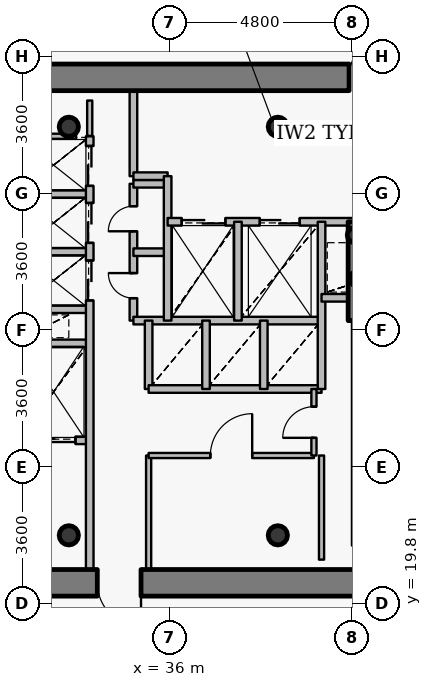
"""IFC4 building model, lengths in metres.
Left out: names, types, materials, properties, quantities, classifications, styles, units other than length and angle.
Written with IfcOpenShell. Run it as: python <this file> out.ifc"""

import sys

from ifc_helpers import new_model, si_unit, direction, frame, frame_2d, origin, origin_2d, place, context, subcontext, project, spatial, rectangle, hollow_circle, extrude, source, transform, mapped, element, fill, save


model = new_model("IFC4")
c1 = context("Model", 3, precision=1e-05, world=origin(), true_north=direction((0.0, 1.0)))
c2 = subcontext(c1, "Body", "Model", "MODEL_VIEW")
j1 = project(units=[si_unit("LENGTHUNIT", "METRE"), si_unit("PLANEANGLEUNIT", "RADIAN")], contexts=[c1])
p1 = place(None, origin())
s1 = spatial("IfcSite", under=j1, at=p1, CompositionType="ELEMENT")
p2 = place(p1, origin())
s2 = spatial("IfcBuilding", under=s1, at=p2, CompositionType="ELEMENT")
p3 = place(p2, frame((0.0, 0.0, 225.3)))
s3 = spatial("IfcBuildingStorey", under=s2, at=p3, CompositionType="ELEMENT", Elevation=225.3)
for number, where, z_axis, x_axis in (
    (1, (33.35, 21.6, 0.0), (0.0, 0.0, 1.0), (1.0, 0.0, 0.0)),
    (2, (38.85, 21.6, 0.0), (0.0, 0.0, 1.0), (1.0, 0.0, 0.0)),
    (3, (38.85, 32.35, 0.0), (0.0, 0.0, 1.0), (1.0, 0.0, 0.0)),
    (4, (33.35, 32.35, 0.0), (0.0, 0.0, 1.0), (1.0, 0.0, 0.0)),
):
    element("IfcColumn", number, at=place(p3, frame(where, z_axis=z_axis, x_axis=x_axis)), inside=s3, PredefinedType="COLUMN", context=c2, shape_type="SweptSolid", body=[
        extrude(hollow_circle(Radius=0.254, WallThickness=0.02, at=origin_2d()), origin(), (0.0, 0.0, 1.0), 3.75),
    ])
for number, where, z_axis, x_axis in (
    (5, (40.95, 28.35, 0.0), (0.0, 0.0, 1.0), (1.0, 0.0, 0.0)),
    (6, (40.88, 29.5, 0.0), (0.0, 0.0, 1.0), (1.0, 0.0, 0.0)),
):
    element("IfcColumn", number, at=place(p3, frame(where, z_axis=z_axis, x_axis=x_axis)), inside=s3, PredefinedType="COLUMN", context=c2, shape_type="SweptSolid", body=[
        extrude(hollow_circle(Radius=0.203, WallThickness=0.016, at=origin_2d()), origin(), (0.0, 0.0, 1.0), 3.75),
    ])
p4 = place(p3, frame((27.05, 33.65, 0.0), z_axis=(0.0, 0.0, 1.0), x_axis=(1.0, 0.0, 0.0)))
e7 = element("IfcWall", 7, at=p4, inside=s3, PredefinedType="SHEAR", context=c2, shape_type="SweptSolid", body=[
    extrude(rectangle(XDim=17.9, YDim=0.7, at=frame_2d((8.95, 0.0))), origin(), (0.0, 0.0, 1.0), 3.05),
])
p5 = place(p4, frame((13.675, 0.0, 0.0)))
e8 = element("IfcOpeningElement", 8, at=p5, cuts=e7, PredefinedType="OPENING", context=c2, shape_type="SweptSolid", body=[
    extrude(rectangle(XDim=1.15, YDim=2.15, at=origin_2d()), frame((0.575, 0.36, 1.075), z_axis=(0.0, -1.0, 0.0), x_axis=(1.0, 0.0, 0.0)), (0.0, 0.0, 1.0), 0.72),
])
p6 = place(p3, frame((44.95, 20.35, 0.0), z_axis=(0.0, 0.0, 1.0), x_axis=(-1.0, 0.0, 0.0)))
e9 = element("IfcWall", 9, at=p6, inside=s3, PredefinedType="SHEAR", context=c2, shape_type="SweptSolid", body=[
    extrude(rectangle(XDim=17.9, YDim=0.7, at=frame_2d((8.95, 0.0))), origin(), (0.0, 0.0, 1.0), 3.05),
])
p7 = place(p6, frame((9.7, 0.0, 0.0)))
e10 = element("IfcOpeningElement", 10, at=p7, cuts=e9, PredefinedType="OPENING", context=c2, shape_type="SweptSolid", body=[
    extrude(rectangle(XDim=1.15, YDim=2.15, at=origin_2d()), frame((0.575, 0.36, 1.075), z_axis=(0.0, -1.0, 0.0), x_axis=(1.0, 0.0, 0.0)), (0.0, 0.0, 1.0), 0.72),
])
p8 = place(p3, frame((40.9, 27.25, 0.0), z_axis=(0.0, 0.0, 1.0), x_axis=(0.0, 1.0, 0.0)))
e11 = element("IfcWall", 11, at=p8, inside=s3, PredefinedType="SHEAR", context=c2, shape_type="SweptSolid", body=[
    extrude(rectangle(XDim=2.6, YDim=0.4, at=frame_2d((1.3, 0.0))), origin(), (0.0, 0.0, 1.0), 3.1),
])
p9 = place(p3, frame((32.0, 24.1, 0.0), z_axis=(0.0, 0.0, 1.0), x_axis=(1.0, 0.0, 0.0)))
e12 = element("IfcWall", 12, at=p9, inside=s3, PredefinedType="PARTITIONING", context=c2, shape_type="SweptSolid", body=[
    extrude(rectangle(XDim=1.9, YDim=0.2, at=frame_2d((0.95, 0.0))), origin(), (0.0, 0.0, 1.0), 3.085),
])
p10 = place(p9, frame((0.375, 0.0, 0.0)))
e13 = element("IfcOpeningElement", 13, at=p10, cuts=e12, PredefinedType="OPENING", context=c2, shape_type="SweptSolid", body=[
    extrude(rectangle(XDim=1.15, YDim=2.15, at=origin_2d()), frame((0.575, 0.11, 1.075), z_axis=(0.0, -1.0, 0.0), x_axis=(1.0, 0.0, 0.0)), (0.0, 0.0, 1.0), 0.22),
])
for number, where, z_axis, x_axis in (
    (14, (32.0, 26.65, 0.0), (0.0, 0.0, 1.0), (1.0, 0.0, 0.0)),
    (15, (32.0, 27.55, 0.0), (0.0, 0.0, 1.0), (1.0, 0.0, 0.0)),
    (16, (32.0, 29.06, 0.0), (0.0, 0.0, 1.0), (1.0, 0.0, 0.0)),
    (17, (32.0, 30.58, 0.0), (0.0, 0.0, 1.0), (1.0, 0.0, 0.0)),
):
    element("IfcWall", number, at=place(p3, frame(where, z_axis=z_axis, x_axis=x_axis)), inside=s3, PredefinedType="PARTITIONING", context=c2, shape_type="SweptSolid", body=[
        extrude(rectangle(XDim=1.9, YDim=0.2, at=frame_2d((0.95, 0.0))), origin(), (0.0, 0.0, 1.0), 3.085),
    ])
p11 = place(p3, frame((33.9, 20.7, 0.0), z_axis=(0.0, 0.0, 1.0), x_axis=(0.0, 1.0, 0.0)))
e18 = element("IfcWall", 18, at=p11, inside=s3, PredefinedType="PARTITIONING", context=c2, shape_type="SweptSolid", body=[
    extrude(rectangle(XDim=11.4, YDim=0.2, at=frame_2d((5.7, 0.0))), origin(), (0.0, 0.0, 1.0), 3.085),
])
p12 = place(p11, frame((7.08, 0.0, 0.0)))
e19 = element("IfcOpeningElement", 19, at=p12, cuts=e18, PredefinedType="OPENING", context=c2, shape_type="SweptSolid", body=[
    extrude(rectangle(XDim=1.05, YDim=2.15, at=origin_2d()), frame((0.525, 0.11, 1.075), z_axis=(0.0, -1.0, 0.0), x_axis=(1.0, 0.0, 0.0)), (0.0, 0.0, 1.0), 0.22),
])
p13 = place(p11, frame((8.595, 0.0, 0.0)))
e20 = element("IfcOpeningElement", 20, at=p13, cuts=e18, PredefinedType="OPENING", context=c2, shape_type="SweptSolid", body=[
    extrude(rectangle(XDim=1.05, YDim=2.15, at=origin_2d()), frame((0.525, 0.11, 1.075), z_axis=(0.0, -1.0, 0.0), x_axis=(1.0, 0.0, 0.0)), (0.0, 0.0, 1.0), 0.22),
])
p14 = place(p11, frame((10.095, 0.0, 0.0)))
e21 = element("IfcOpeningElement", 21, at=p14, cuts=e18, PredefinedType="OPENING", context=c2, shape_type="SweptSolid", body=[
    extrude(rectangle(XDim=1.05, YDim=2.15, at=origin_2d()), frame((0.525, 0.11, 1.075), z_axis=(0.0, -1.0, 0.0), x_axis=(1.0, 0.0, 0.0)), (0.0, 0.0, 1.0), 0.22),
])
p15 = place(p3, frame((35.05, 27.25, 0.0), z_axis=(0.0, 0.0, 1.0), x_axis=(0.0, 1.0, 0.0)))
e22 = element("IfcWall", 22, at=p15, inside=s3, PredefinedType="PARTITIONING", context=c2, shape_type="SweptSolid", body=[
    extrude(rectangle(XDim=3.6, YDim=0.2, at=frame_2d((1.8, 0.0))), origin(), (0.0, 0.0, 1.0), 3.5),
])
p16 = place(p15, frame((0.59, 0.0, 0.0)))
e23 = element("IfcOpeningElement", 23, at=p16, cuts=e22, PredefinedType="OPENING", context=c2, shape_type="SweptSolid", body=[
    extrude(rectangle(XDim=0.66, YDim=2.05, at=origin_2d()), frame((0.33, 0.11, 1.025), z_axis=(0.0, -1.0, 0.0), x_axis=(1.0, 0.0, 0.0)), (0.0, 0.0, 1.0), 0.22),
])
p17 = place(p15, frame((2.35, 0.0, 0.0)))
e24 = element("IfcOpeningElement", 24, at=p17, cuts=e22, PredefinedType="OPENING", context=c2, shape_type="SweptSolid", body=[
    extrude(rectangle(XDim=0.66, YDim=2.05, at=origin_2d()), frame((0.33, 0.11, 1.025), z_axis=(0.0, -1.0, 0.0), x_axis=(1.0, 0.0, 0.0)), (0.0, 0.0, 1.0), 0.22),
])
p18 = place(p3, frame((35.05, 27.25, 0.0), z_axis=(0.0, 0.0, 1.0), x_axis=(1.0, 0.0, 0.0)))
e25 = element("IfcWall", 25, at=p18, inside=s3, PredefinedType="PARTITIONING", context=c2, shape_type="SweptSolid", body=[
    extrude(rectangle(XDim=4.95, YDim=0.2, at=frame_2d((2.475, 0.0))), origin(), (0.0, 0.0, 1.0), 3.085),
])
for number, where, z_axis, x_axis in (
    (26, (35.05, 29.05, 0.0), (0.0, 0.0, 1.0), (1.0, 0.0, 0.0)),
    (27, (35.05, 30.85, 0.0), (0.0, 0.0, 1.0), (1.0, 0.0, 0.0)),
):
    element("IfcWall", number, at=place(p3, frame(where, z_axis=z_axis, x_axis=x_axis)), inside=s3, PredefinedType="PARTITIONING", context=c2, shape_type="SweptSolid", body=[
        extrude(rectangle(XDim=0.9, YDim=0.2, at=frame_2d((0.45, 0.0))), origin(), (0.0, 0.0, 1.0), 3.5),
    ])
p19 = place(p3, frame((35.05, 31.05, 0.0), z_axis=(0.0, 0.0, 1.0), x_axis=(0.0, 1.0, 0.0)))
e28 = element("IfcWall", 28, at=p19, inside=s3, PredefinedType="PARTITIONING", context=c2, shape_type="SweptSolid", body=[
    extrude(rectangle(XDim=2.25, YDim=0.2, at=frame_2d((1.125, 0.0))), origin(), (0.0, 0.0, 1.0), 3.085),
])
p20 = place(p3, frame((35.05, 31.05, 0.0), z_axis=(0.0, 0.0, 1.0), x_axis=(1.0, 0.0, 0.0)))
e29 = element("IfcWall", 29, at=p20, inside=s3, PredefinedType="PARTITIONING", context=c2, shape_type="SweptSolid", body=[
    extrude(rectangle(XDim=0.9, YDim=0.2, at=frame_2d((0.45, 0.0))), origin(), (0.0, 0.0, 1.0), 3.5),
])
p21 = place(p3, frame((35.45, 20.7, 0.0), z_axis=(0.0, 0.0, 1.0), x_axis=(0.0, 1.0, 0.0)))
e30 = element("IfcWall", 30, at=p21, inside=s3, PredefinedType="PARTITIONING", context=c2, shape_type="SweptSolid", body=[
    extrude(rectangle(XDim=3.0, YDim=0.135, at=frame_2d((1.5, 0.0))), origin(), (0.0, 0.0, 1.0), 3.085),
])
p22 = place(p3, frame((35.45, 23.7, 0.0), z_axis=(0.0, 0.0, 1.0), x_axis=(1.0, 0.0, 0.0)))
e31 = element("IfcWall", 31, at=p22, inside=s3, PredefinedType="PARTITIONING", context=c2, shape_type="SweptSolid", body=[
    extrude(rectangle(XDim=4.35, YDim=0.135, at=frame_2d((2.175, 0.0))), origin(), (0.0, 0.0, 1.0), 3.085),
])
p23 = place(p22, frame((1.625, 0.0, 0.0)))
e32 = element("IfcOpeningElement", 32, at=p23, cuts=e31, PredefinedType="OPENING", context=c2, shape_type="SweptSolid", body=[
    extrude(rectangle(XDim=1.1, YDim=2.15, at=origin_2d()), frame((0.55, 0.078, 1.075), z_axis=(0.0, -1.0, 0.0), x_axis=(1.0, 0.0, 0.0)), (0.0, 0.0, 1.0), 0.155),
])
p24 = place(p3, frame((35.45, 25.45, 0.0), z_axis=(0.0, 0.0, 1.0), x_axis=(0.0, 1.0, 0.0)))
e33 = element("IfcWall", 33, at=p24, inside=s3, PredefinedType="PARTITIONING", context=c2, shape_type="SweptSolid", body=[
    extrude(rectangle(XDim=1.8, YDim=0.2, at=frame_2d((0.9, 0.0))), origin(), (0.0, 0.0, 1.0), 3.5),
])
p25 = place(p3, frame((35.45, 25.45, 0.0), z_axis=(0.0, 0.0, 1.0), x_axis=(1.0, 0.0, 0.0)))
e34 = element("IfcWall", 34, at=p25, inside=s3, PredefinedType="PARTITIONING", context=c2, shape_type="SweptSolid", body=[
    extrude(rectangle(XDim=4.55, YDim=0.2, at=frame_2d((2.275, 0.0))), origin(), (0.0, 0.0, 1.0), 3.085),
])
p26 = place(p3, frame((35.95, 27.25, 0.0), z_axis=(0.0, 0.0, 1.0), x_axis=(0.0, 1.0, 0.0)))
e35 = element("IfcWall", 35, at=p26, inside=s3, PredefinedType="PARTITIONING", context=c2, shape_type="SweptSolid", body=[
    extrude(rectangle(XDim=3.8, YDim=0.2, at=frame_2d((1.9, 0.0))), origin(), (0.0, 0.0, 1.0), 3.5),
])
p27 = place(p3, frame((35.95, 29.85, 0.0), z_axis=(0.0, 0.0, 1.0), x_axis=(1.0, 0.0, 0.0)))
e36 = element("IfcWall", 36, at=p27, inside=s3, PredefinedType="PARTITIONING", context=c2, shape_type="SweptSolid", body=[
    extrude(rectangle(XDim=8.49, YDim=0.2, at=frame_2d((4.245, 0.0))), origin(), (0.0, 0.0, 1.0), 3.085),
])
p28 = place(p27, frame((6.1, 0.0, 0.0)))
e37 = element("IfcOpeningElement", 37, at=p28, cuts=e36, PredefinedType="OPENING", context=c2, shape_type="SweptSolid", body=[
    extrude(rectangle(XDim=1.2, YDim=2.15, at=origin_2d()), frame((0.6, 0.11, 1.075), z_axis=(0.0, -1.0, 0.0), x_axis=(1.0, 0.0, 0.0)), (0.0, 0.0, 1.0), 0.22),
])
p29 = place(p27, frame((0.37, 0.0, 0.0)))
e38 = element("IfcOpeningElement", 38, at=p29, cuts=e36, PredefinedType="OPENING", context=c2, shape_type="SweptSolid", body=[
    extrude(rectangle(XDim=1.15, YDim=2.15, at=origin_2d()), frame((0.575, 0.11, 1.075), z_axis=(0.0, -1.0, 0.0), x_axis=(1.0, 0.0, 0.0)), (0.0, 0.0, 1.0), 0.22),
])
p30 = place(p27, frame((2.425, 0.0, 0.0)))
e39 = element("IfcOpeningElement", 39, at=p30, cuts=e36, PredefinedType="OPENING", context=c2, shape_type="SweptSolid", body=[
    extrude(rectangle(XDim=1.05, YDim=2.15, at=origin_2d()), frame((0.525, 0.11, 1.075), z_axis=(0.0, -1.0, 0.0), x_axis=(1.0, 0.0, 0.0)), (0.0, 0.0, 1.0), 0.22),
])
p31 = place(p3, frame((36.96, 25.45, 0.0), z_axis=(0.0, 0.0, 1.0), x_axis=(0.0, 1.0, 0.0)))
e40 = element("IfcWall", 40, at=p31, inside=s3, PredefinedType="PARTITIONING", context=c2, shape_type="SweptSolid", body=[
    extrude(rectangle(XDim=1.8, YDim=0.2, at=frame_2d((0.9, 0.0))), origin(), (0.0, 0.0, 1.0), 3.5),
])
p32 = place(p3, frame((37.8, 27.25, 0.0), z_axis=(0.0, 0.0, 1.0), x_axis=(0.0, 1.0, 0.0)))
e41 = element("IfcWall", 41, at=p32, inside=s3, PredefinedType="PARTITIONING", context=c2, shape_type="SweptSolid", body=[
    extrude(rectangle(XDim=2.6, YDim=0.2, at=frame_2d((1.3, 0.0))), origin(), (0.0, 0.0, 1.0), 3.5),
])
p33 = place(p3, frame((38.48, 25.45, 0.0), z_axis=(0.0, 0.0, 1.0), x_axis=(0.0, 1.0, 0.0)))
e42 = element("IfcWall", 42, at=p33, inside=s3, PredefinedType="PARTITIONING", context=c2, shape_type="SweptSolid", body=[
    extrude(rectangle(XDim=1.8, YDim=0.2, at=frame_2d((0.9, 0.0))), origin(), (0.0, 0.0, 1.0), 3.5),
])
p34 = place(p3, frame((39.8, 23.7, 0.0), z_axis=(0.0, 0.0, 1.0), x_axis=(0.0, 1.0, 0.0)))
e43 = element("IfcWall", 43, at=p34, inside=s3, PredefinedType="PARTITIONING", context=c2, shape_type="SweptSolid", body=[
    extrude(rectangle(XDim=1.75, YDim=0.135, at=frame_2d((0.875, 0.0))), origin(), (0.0, 0.0, 1.0), 3.5),
])
p35 = place(p34, frame((0.465, 0.0, 0.0)))
e44 = element("IfcOpeningElement", 44, at=p35, cuts=e43, PredefinedType="OPENING", context=c2, shape_type="SweptSolid", body=[
    extrude(rectangle(XDim=0.82, YDim=2.1, at=origin_2d()), frame((0.41, 0.078, 1.05), z_axis=(0.0, -1.0, 0.0), x_axis=(1.0, 0.0, 0.0)), (0.0, 0.0, 1.0), 0.155),
])
p36 = place(p3, frame((40.0, 25.45, 0.0), z_axis=(0.0, 0.0, 1.0), x_axis=(0.0, 1.0, 0.0)))
e45 = element("IfcWall", 45, at=p36, inside=s3, PredefinedType="PARTITIONING", context=c2, shape_type="SweptSolid", body=[
    extrude(rectangle(XDim=4.4, YDim=0.2, at=frame_2d((2.2, 0.0))), origin(), (0.0, 0.0, 1.0), 3.5),
])
p37 = place(p3, frame((40.0, 27.85, 0.0), z_axis=(0.0, 0.0, 1.0), x_axis=(1.0, 0.0, 0.0)))
e46 = element("IfcWall", 46, at=p37, inside=s3, PredefinedType="PARTITIONING", context=c2, shape_type="SweptSolid", body=[
    extrude(rectangle(XDim=0.9, YDim=0.2, at=frame_2d((0.45, 0.0))), origin(), (0.0, 0.0, 1.0), 3.5),
])
p38 = place(p3, frame((40.9, 21.33, 0.0), z_axis=(0.0, 0.0, 1.0), x_axis=(0.0, 1.0, 0.0)))
e47 = element("IfcWall", 47, at=p38, inside=s3, PredefinedType="PARTITIONING", context=c2, shape_type="SweptSolid", body=[
    extrude(rectangle(XDim=5.91, YDim=0.2, at=frame_2d((2.955, 0.0))), origin(), (0.0, 0.0, 1.0), 3.035),
])
p39 = place(p3, frame((32.36, 32.1, 0.0), z_axis=(0.0, 0.0, 1.0), x_axis=(1.0, 0.0, 0.0)))
e48 = element("IfcWall", 48, at=p39, inside=s3, PredefinedType="PARTITIONING", context=c2, shape_type="SweptSolid", body=[
    extrude(rectangle(XDim=1.18, YDim=0.135, at=frame_2d((0.59, 0.0))), origin(), (0.0, 0.0, 1.0), 3.085),
])
p40 = place(p3, frame((40.0, 23.7, 0.0), z_axis=(0.0, 0.0, 1.0), x_axis=(0.0, -1.0, 0.0)))
e49 = element("IfcWall", 49, at=p40, inside=s3, PredefinedType="PARTITIONING", context=c2, shape_type="SweptSolid", body=[
    extrude(rectangle(XDim=2.74, YDim=0.135, at=frame_2d((1.37, 0.0))), origin(), (0.0, 0.0, 1.0), 3.035),
])
p41 = place(p3, frame((33.9, 32.11, 0.0), z_axis=(0.0, 0.0, 1.0), x_axis=(0.0, 1.0, 0.0)))
e50 = element("IfcWall", 50, at=p41, inside=s3, PredefinedType="PARTITIONING", context=c2, shape_type="SweptSolid", body=[
    extrude(rectangle(XDim=0.93, YDim=0.135, at=frame_2d((0.465, 0.0))), origin(), (0.0, 0.0, 1.0), 3.085),
])
m1 = source(origin(), c2, "Body", "SweptSolid", [
    extrude(rectangle(XDim=1.15, YDim=2.15, at=origin_2d()), frame((0.575, 0.025, 1.075), z_axis=(0.0, -1.0, 0.0), x_axis=(1.0, 0.0, 0.0)), (0.0, 0.0, 1.0), 0.05),
])
p42 = place(p5, origin())
e51 = element("IfcDoor", 51, at=p42, inside=s3, OperationType="SINGLE_SWING_RIGHT", PredefinedType="DOOR", context=c2, shape_type="MappedRepresentation", body=[
    mapped(m1, transform((0.0, 0.0, 0.0), x_axis=(1.0, 0.0, 0.0), y_axis=(0.0, 1.0, 0.0), z_axis=(0.0, 0.0, 1.0), scale=1.0)),
])
fill(e8, e51)
p43 = place(p7, origin())
e52 = element("IfcDoor", 52, at=p43, inside=s3, OperationType="SINGLE_SWING_LEFT", PredefinedType="DOOR", context=c2, shape_type="MappedRepresentation", body=[
    mapped(m1, transform((0.0, 0.0, 0.0), x_axis=(1.0, 0.0, 0.0), y_axis=(0.0, 1.0, 0.0), z_axis=(0.0, 0.0, 1.0), scale=1.0)),
])
fill(e10, e52)
m2 = source(origin(), c2, "Body", "SweptSolid", [
    extrude(rectangle(XDim=1.15, YDim=2.15, at=origin_2d()), frame((0.575, 0.025, 1.075), z_axis=(0.0, -1.0, 0.0), x_axis=(1.0, 0.0, 0.0)), (0.0, 0.0, 1.0), 0.05),
])
p44 = place(p29, origin())
e53 = element("IfcDoor", 53, at=p44, inside=s3, OperationType="DOUBLE_DOOR_SLIDING", PredefinedType="USERDEFINED", context=c2, shape_type="MappedRepresentation", body=[
    mapped(m2, transform((0.0, 0.0, 0.0), x_axis=(1.0, 0.0, 0.0), y_axis=(0.0, 1.0, 0.0), z_axis=(0.0, 0.0, 1.0), scale=1.0)),
])
fill(e38, e53)
p45 = place(p10, origin())
e54 = element("IfcDoor", 54, at=p45, inside=s3, OperationType="DOUBLE_DOOR_SLIDING", PredefinedType="USERDEFINED", context=c2, shape_type="MappedRepresentation", body=[
    mapped(m2, transform((0.0, 0.0, 0.0), x_axis=(1.0, 0.0, 0.0), y_axis=(0.0, 1.0, 0.0), z_axis=(0.0, 0.0, 1.0), scale=1.0)),
])
fill(e13, e54)
m3 = source(origin(), c2, "Body", "SweptSolid", [
    extrude(rectangle(XDim=1.05, YDim=2.15, at=origin_2d()), frame((0.525, 0.025, 1.075), z_axis=(0.0, -1.0, 0.0), x_axis=(1.0, 0.0, 0.0)), (0.0, 0.0, 1.0), 0.05),
])
p46 = place(p30, origin())
e55 = element("IfcDoor", 55, at=p46, inside=s3, OperationType="DOUBLE_DOOR_SLIDING", PredefinedType="USERDEFINED", context=c2, shape_type="MappedRepresentation", body=[
    mapped(m3, transform((0.0, 0.0, 0.0), x_axis=(1.0, 0.0, 0.0), y_axis=(0.0, 1.0, 0.0), z_axis=(0.0, 0.0, 1.0), scale=1.0)),
])
fill(e39, e55)
p47 = place(p12, origin())
e56 = element("IfcDoor", 56, at=p47, inside=s3, OperationType="DOUBLE_DOOR_SLIDING", PredefinedType="USERDEFINED", context=c2, shape_type="MappedRepresentation", body=[
    mapped(m3, transform((0.0, 0.0, 0.0), x_axis=(1.0, 0.0, 0.0), y_axis=(0.0, 1.0, 0.0), z_axis=(0.0, 0.0, 1.0), scale=1.0)),
])
fill(e19, e56)
p48 = place(p13, origin())
e57 = element("IfcDoor", 57, at=p48, inside=s3, OperationType="DOUBLE_DOOR_SLIDING", PredefinedType="USERDEFINED", context=c2, shape_type="MappedRepresentation", body=[
    mapped(m3, transform((0.0, 0.0, 0.0), x_axis=(1.0, 0.0, 0.0), y_axis=(0.0, 1.0, 0.0), z_axis=(0.0, 0.0, 1.0), scale=1.0)),
])
fill(e20, e57)
p49 = place(p14, origin())
e58 = element("IfcDoor", 58, at=p49, inside=s3, OperationType="DOUBLE_DOOR_SLIDING", PredefinedType="USERDEFINED", context=c2, shape_type="MappedRepresentation", body=[
    mapped(m3, transform((0.0, 0.0, 0.0), x_axis=(1.0, 0.0, 0.0), y_axis=(0.0, 1.0, 0.0), z_axis=(0.0, 0.0, 1.0), scale=1.0)),
])
fill(e21, e58)
m4 = source(origin(), c2, "Body", "SweptSolid", [
    extrude(rectangle(XDim=0.66, YDim=2.05, at=origin_2d()), frame((0.33, 0.025, 1.025), z_axis=(0.0, -1.0, 0.0), x_axis=(1.0, 0.0, 0.0)), (0.0, 0.0, 1.0), 0.05),
])
p50 = place(p16, origin())
e59 = element("IfcDoor", 59, at=p50, inside=s3, OperationType="SINGLE_SWING_RIGHT", PredefinedType="USERDEFINED", context=c2, shape_type="MappedRepresentation", body=[
    mapped(m4, transform((0.0, 0.0, 0.0), x_axis=(1.0, 0.0, 0.0), y_axis=(0.0, 1.0, 0.0), z_axis=(0.0, 0.0, 1.0), scale=1.0)),
])
fill(e23, e59)
p51 = place(p17, origin())
e60 = element("IfcDoor", 60, at=p51, inside=s3, OperationType="SINGLE_SWING_LEFT", PredefinedType="USERDEFINED", context=c2, shape_type="MappedRepresentation", body=[
    mapped(m4, transform((0.0, 0.0, 0.0), x_axis=(1.0, 0.0, 0.0), y_axis=(0.0, 1.0, 0.0), z_axis=(0.0, 0.0, 1.0), scale=1.0)),
])
fill(e24, e60)
m5 = source(origin(), c2, "Body", "SweptSolid", [
    extrude(rectangle(XDim=1.1, YDim=2.15, at=origin_2d()), frame((0.55, 0.025, 1.075), z_axis=(0.0, -1.0, 0.0), x_axis=(1.0, 0.0, 0.0)), (0.0, 0.0, 1.0), 0.05),
])
p52 = place(p23, origin())
e61 = element("IfcDoor", 61, at=p52, inside=s3, OperationType="SINGLE_SWING_RIGHT", PredefinedType="DOOR", context=c2, shape_type="MappedRepresentation", body=[
    mapped(m5, transform((0.0, 0.0, 0.0), x_axis=(1.0, 0.0, 0.0), y_axis=(0.0, 1.0, 0.0), z_axis=(0.0, 0.0, 1.0), scale=1.0)),
])
fill(e32, e61)
m6 = source(origin(), c2, "Body", "SweptSolid", [
    extrude(rectangle(XDim=0.82, YDim=2.1, at=origin_2d()), frame((0.41, 0.025, 1.05), z_axis=(0.0, -1.0, 0.0), x_axis=(1.0, 0.0, 0.0)), (0.0, 0.0, 1.0), 0.05),
])
p53 = place(p35, origin())
e62 = element("IfcDoor", 62, at=p53, inside=s3, OperationType="SINGLE_SWING_LEFT", PredefinedType="DOOR", context=c2, shape_type="MappedRepresentation", body=[
    mapped(m6, transform((0.0, 0.0, 0.0), x_axis=(1.0, 0.0, 0.0), y_axis=(0.0, 1.0, 0.0), z_axis=(0.0, 0.0, 1.0), scale=1.0)),
])
fill(e44, e62)
save(model, sys.argv[1])
